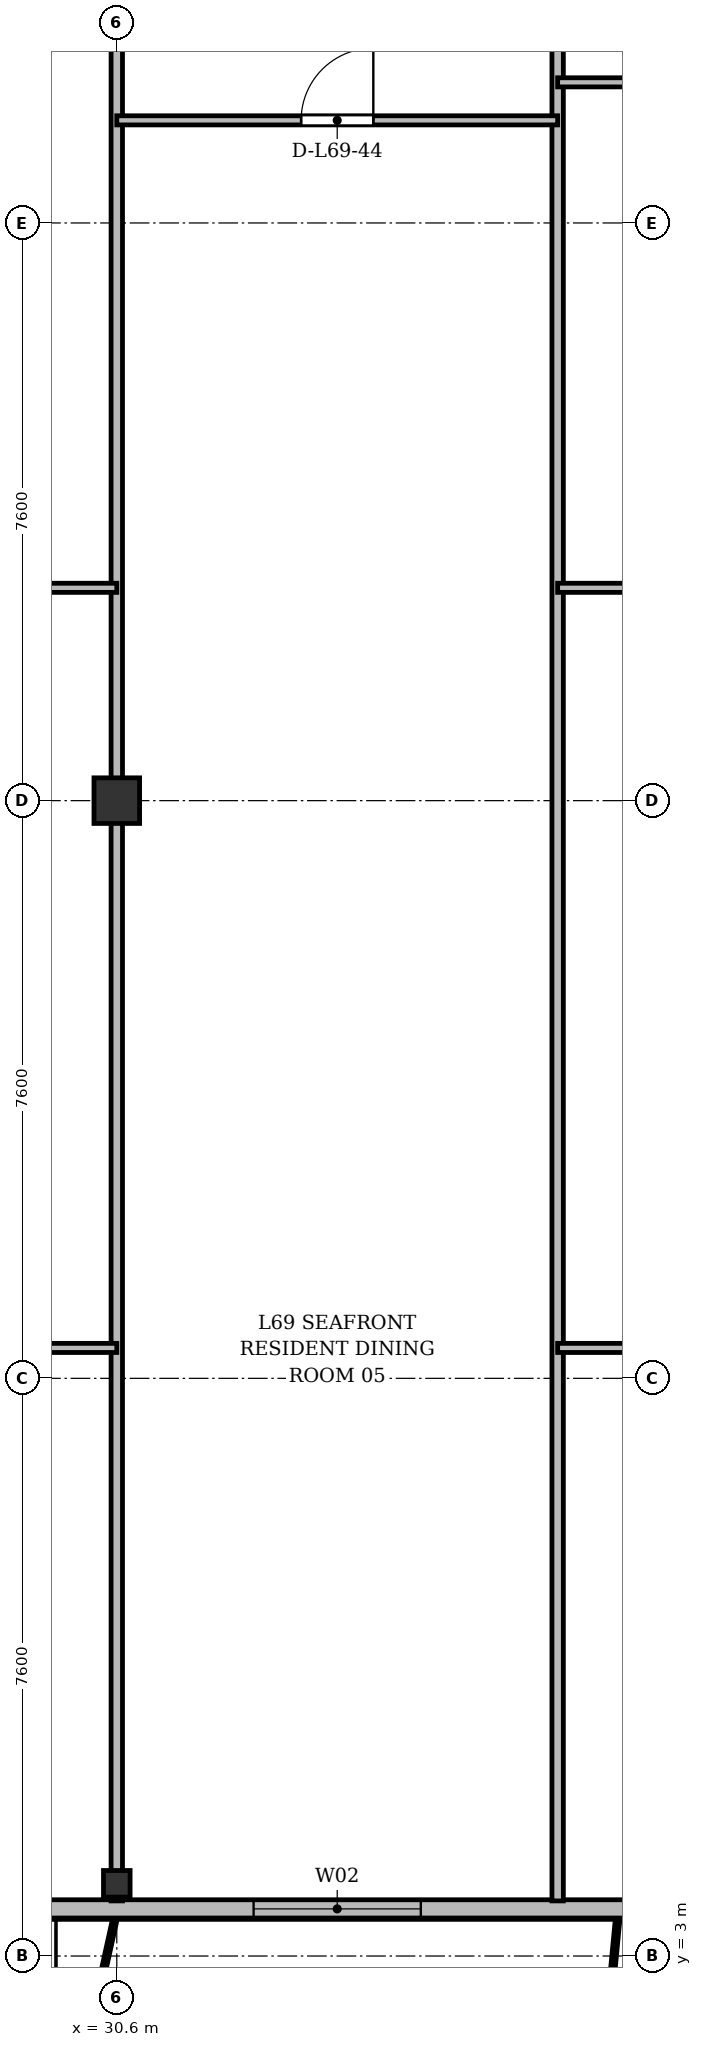
"""IFC4 building model, lengths in metres.
Left out: names, types, materials, properties, quantities, classifications, styles, units other than length and angle.
Written with IfcOpenShell. Run it as: python <this file> out.ifc"""

import sys

from ifc_helpers import new_model, si_unit, direction, frame, frame_2d, origin, origin_2d, place, context, subcontext, project, spatial, rectangle, i_section, extrude, source, transform, mapped, element, fill, save


model = new_model("IFC4")
c1 = context("Model", 3, precision=1e-05, world=origin(), true_north=direction((0.0, 1.0)))
c2 = subcontext(c1, "Body", "Model", "MODEL_VIEW")
j1 = project(units=[si_unit("LENGTHUNIT", "METRE"), si_unit("PLANEANGLEUNIT", "RADIAN")], contexts=[c1])
p1 = place(None, origin())
s1 = spatial("IfcSite", under=j1, at=p1, CompositionType="ELEMENT")
p2 = place(p1, origin())
s2 = spatial("IfcBuilding", under=s1, at=p2, CompositionType="ELEMENT")
p3 = place(p2, frame((0.0, 0.0, 266.7)))
s3 = spatial("IfcBuildingStorey", under=s2, at=p3, CompositionType="ELEMENT", Elevation=266.7)
m1 = source(origin(), c2, "Body", "SweptSolid", [
    extrude(i_section(OverallWidth=0.35, OverallDepth=0.35, WebThickness=0.018, FlangeThickness=0.028, at=origin_2d()), origin(), (0.0, 0.0, 1.0), 3.6),
])
p4 = place(p3, frame((30.6, 3.95, 0.0), z_axis=(0.0, 0.0, 1.0), x_axis=(1.0, 0.0, 0.0)))
e1 = element("IfcColumn", 1, at=p4, inside=s3, PredefinedType="COLUMN", context=c2, shape_type="MappedRepresentation", body=[
    mapped(m1, transform((0.0, 0.0, 0.0), x_axis=(1.0, 0.0, 0.0), y_axis=(0.0, 1.0, 0.0), z_axis=(0.0, 0.0, 1.0), scale=1.0)),
])
m2 = source(origin(), c2, "Body", "SweptSolid", [
    extrude(rectangle(XDim=0.6, YDim=0.6, at=origin_2d()), origin(), (0.0, 0.0, 1.0), 3.6),
])
p5 = place(p3, frame((30.6, 18.2, 0.0), z_axis=(0.0, 0.0, 1.0), x_axis=(1.0, 0.0, 0.0)))
e2 = element("IfcColumn", 2, at=p5, inside=s3, PredefinedType="COLUMN", context=c2, shape_type="MappedRepresentation", body=[
    mapped(m2, transform((0.0, 0.0, 0.0), x_axis=(1.0, 0.0, 0.0), y_axis=(0.0, 1.0, 0.0), z_axis=(0.0, 0.0, 1.0), scale=1.0)),
])
p6 = place(p3, frame((63.2, 3.62, 0.0), z_axis=(0.0, 0.0, 1.0), x_axis=(-1.0, 0.0, 0.0)))
e3 = element("IfcWall", 3, at=p6, inside=s3, PredefinedType="SOLIDWALL", context=c2, shape_type="SweptSolid", body=[
    extrude(rectangle(XDim=52.0, YDim=0.24, at=frame_2d((26.0, 0.0))), origin(), (0.0, 0.0, 1.0), 3.37),
])
p7 = place(p6, frame((0.345, 0.0, 0.9)))
e4 = element("IfcOpeningElement", 4, at=p7, cuts=e3, PredefinedType="OPENING", context=c2, shape_type="SweptSolid", body=[
    extrude(rectangle(XDim=1.2, YDim=1.65, at=frame_2d((0.6, 0.825))), frame((0.0, 0.13, 0.0), z_axis=(0.0, -1.0, 0.0), x_axis=(1.0, 0.0, 0.0)), (0.0, 0.0, 1.0), 0.26),
])
p8 = place(p6, frame((2.15, 0.0, 0.9)))
e5 = element("IfcOpeningElement", 5, at=p8, cuts=e3, PredefinedType="OPENING", context=c2, shape_type="SweptSolid", body=[
    extrude(rectangle(XDim=1.8, YDim=1.8, at=frame_2d((0.9, 0.9))), frame((0.0, 0.13, 0.0), z_axis=(0.0, -1.0, 0.0), x_axis=(1.0, 0.0, 0.0)), (0.0, 0.0, 1.0), 0.26),
])
p9 = place(p6, frame((5.42, 0.0, 0.0)))
e6 = element("IfcOpeningElement", 6, at=p9, cuts=e3, PredefinedType="OPENING", context=c2, shape_type="SweptSolid", body=[
    extrude(rectangle(XDim=1.2, YDim=2.2, at=frame_2d((0.6, 1.1))), frame((0.0, 0.13, 0.0), z_axis=(0.0, -1.0, 0.0), x_axis=(1.0, 0.0, 0.0)), (0.0, 0.0, 1.0), 0.26),
])
p10 = place(p6, frame((8.75, 0.0, 0.9)))
e7 = element("IfcOpeningElement", 7, at=p10, cuts=e3, PredefinedType="OPENING", context=c2, shape_type="SweptSolid", body=[
    extrude(rectangle(XDim=1.5, YDim=1.75, at=frame_2d((0.75, 0.875))), frame((0.0, 0.13, 0.0), z_axis=(0.0, -1.0, 0.0), x_axis=(1.0, 0.0, 0.0)), (0.0, 0.0, 1.0), 0.26),
])
p11 = place(p6, frame((14.8, 0.0, 0.9)))
e8 = element("IfcOpeningElement", 8, at=p11, cuts=e3, PredefinedType="OPENING", context=c2, shape_type="SweptSolid", body=[
    extrude(rectangle(XDim=2.0, YDim=1.95, at=frame_2d((1.0, 0.975))), frame((0.0, 0.13, 0.0), z_axis=(0.0, -1.0, 0.0), x_axis=(1.0, 0.0, 0.0)), (0.0, 0.0, 1.0), 0.26),
])
p12 = place(p6, frame((20.425, 0.0, 0.9)))
e9 = element("IfcOpeningElement", 9, at=p12, cuts=e3, PredefinedType="OPENING", context=c2, shape_type="SweptSolid", body=[
    extrude(rectangle(XDim=1.65, YDim=1.85, at=frame_2d((0.825, 0.925))), frame((0.0, 0.13, 0.0), z_axis=(0.0, -1.0, 0.0), x_axis=(1.0, 0.0, 0.0)), (0.0, 0.0, 1.0), 0.26),
])
p13 = place(p6, frame((24.05, 0.0, 0.9)))
e10 = element("IfcOpeningElement", 10, at=p13, cuts=e3, PredefinedType="OPENING", context=c2, shape_type="SweptSolid", body=[
    extrude(rectangle(XDim=1.8, YDim=1.8, at=frame_2d((0.9, 0.9))), frame((0.0, 0.13, 0.0), z_axis=(0.0, -1.0, 0.0), x_axis=(1.0, 0.0, 0.0)), (0.0, 0.0, 1.0), 0.26),
])
p14 = place(p6, frame((28.6, 0.0, 0.9)))
e11 = element("IfcOpeningElement", 11, at=p14, cuts=e3, PredefinedType="OPENING", context=c2, shape_type="SweptSolid", body=[
    extrude(rectangle(XDim=2.2, YDim=1.8, at=frame_2d((1.1, 0.9))), frame((0.0, 0.13, 0.0), z_axis=(0.0, -1.0, 0.0), x_axis=(1.0, 0.0, 0.0)), (0.0, 0.0, 1.0), 0.26),
])
p15 = place(p6, frame((34.078, 0.0, 0.0)))
e12 = element("IfcOpeningElement", 12, at=p15, cuts=e3, PredefinedType="OPENING", context=c2, shape_type="SweptSolid", body=[
    extrude(rectangle(XDim=1.2, YDim=2.2, at=frame_2d((0.6, 1.1))), frame((0.0, 0.13, 0.0), z_axis=(0.0, -1.0, 0.0), x_axis=(1.0, 0.0, 0.0)), (0.0, 0.0, 1.0), 0.26),
])
p16 = place(p6, frame((37.0, 0.0, 0.9)))
e13 = element("IfcOpeningElement", 13, at=p16, cuts=e3, PredefinedType="OPENING", context=c2, shape_type="SweptSolid", body=[
    extrude(rectangle(XDim=2.0, YDim=1.95, at=frame_2d((1.0, 0.975))), frame((0.0, 0.13, 0.0), z_axis=(0.0, -1.0, 0.0), x_axis=(1.0, 0.0, 0.0)), (0.0, 0.0, 1.0), 0.26),
])
p17 = place(p6, frame((41.075, 0.0, 0.9)))
e14 = element("IfcOpeningElement", 14, at=p17, cuts=e3, PredefinedType="OPENING", context=c2, shape_type="SweptSolid", body=[
    extrude(rectangle(XDim=1.65, YDim=1.85, at=frame_2d((0.825, 0.925))), frame((0.0, 0.13, 0.0), z_axis=(0.0, -1.0, 0.0), x_axis=(1.0, 0.0, 0.0)), (0.0, 0.0, 1.0), 0.26),
])
p18 = place(p6, frame((44.19, 0.0, 0.9)))
e15 = element("IfcOpeningElement", 15, at=p18, cuts=e3, PredefinedType="OPENING", context=c2, shape_type="SweptSolid", body=[
    extrude(rectangle(XDim=1.8, YDim=1.8, at=frame_2d((0.9, 0.9))), frame((0.0, 0.13, 0.0), z_axis=(0.0, -1.0, 0.0), x_axis=(1.0, 0.0, 0.0)), (0.0, 0.0, 1.0), 0.26),
])
p19 = place(p6, frame((50.005, 0.0, 0.9)))
e16 = element("IfcOpeningElement", 16, at=p19, cuts=e3, PredefinedType="OPENING", context=c2, shape_type="SweptSolid", body=[
    extrude(rectangle(XDim=1.5, YDim=1.75, at=frame_2d((0.75, 0.875))), frame((0.0, 0.13, 0.0), z_axis=(0.0, -1.0, 0.0), x_axis=(1.0, 0.0, 0.0)), (0.0, 0.0, 1.0), 0.26),
])
p20 = place(p3, frame((30.6, 3.725, 0.0), z_axis=(0.0, 0.0, 1.0), x_axis=(0.0, 1.0, 0.0)))
e17 = element("IfcWall", 17, at=p20, inside=s3, PredefinedType="PARTITIONING", context=c2, shape_type="SweptSolid", body=[
    extrude(rectangle(XDim=27.275, YDim=0.15, at=frame_2d((13.637, 0.0))), origin(), (0.0, 0.0, 1.0), 2.87),
])
p21 = place(p3, frame((36.4, 3.725, 0.0), z_axis=(0.0, 0.0, 1.0), x_axis=(0.0, 1.0, 0.0)))
e18 = element("IfcWall", 18, at=p21, inside=s3, PredefinedType="PARTITIONING", context=c2, shape_type="SweptSolid", body=[
    extrude(rectangle(XDim=27.275, YDim=0.15, at=frame_2d((13.637, 0.0))), origin(), (0.0, 0.0, 1.0), 2.92),
])
p22 = place(p3, frame((23.4, 21.0, 0.0), z_axis=(0.0, 0.0, 1.0), x_axis=(1.0, 0.0, 0.0)))
e19 = element("IfcWall", 19, at=p22, inside=s3, PredefinedType="PARTITIONING", context=c2, shape_type="SweptSolid", body=[
    extrude(rectangle(XDim=7.2, YDim=0.12, at=frame_2d((3.6, 0.0))), origin(), (0.0, 0.0, 1.0), 2.87),
])
p23 = place(p22, frame((3.125, 0.0, 0.0)))
e20 = element("IfcOpeningElement", 20, at=p23, cuts=e19, PredefinedType="OPENING", context=c2, shape_type="SweptSolid", body=[
    extrude(rectangle(XDim=0.95, YDim=2.15, at=frame_2d((0.475, 1.075))), frame((0.0, 0.07, 0.0), z_axis=(0.0, -1.0, 0.0), x_axis=(1.0, 0.0, 0.0)), (0.0, 0.0, 1.0), 0.14),
])
p24 = place(p3, frame((27.0, 11.0, 0.0), z_axis=(0.0, 0.0, 1.0), x_axis=(1.0, 0.0, 0.0)))
e21 = element("IfcWall", 21, at=p24, inside=s3, PredefinedType="PARTITIONING", context=c2, shape_type="SweptSolid", body=[
    extrude(rectangle(XDim=3.6, YDim=0.12, at=frame_2d((1.8, 0.0))), origin(), (0.0, 0.0, 1.0), 2.87),
])
p25 = place(p24, frame((1.325, 0.0, 0.0)))
e22 = element("IfcOpeningElement", 22, at=p25, cuts=e21, PredefinedType="OPENING", context=c2, shape_type="SweptSolid", body=[
    extrude(rectangle(XDim=0.95, YDim=2.15, at=frame_2d((0.475, 1.075))), frame((0.0, 0.07, 0.0), z_axis=(0.0, -1.0, 0.0), x_axis=(1.0, 0.0, 0.0)), (0.0, 0.0, 1.0), 0.14),
])
p26 = place(p3, frame((30.6, 27.15, 0.0), z_axis=(0.0, 0.0, 1.0), x_axis=(1.0, 0.0, 0.0)))
e23 = element("IfcWall", 23, at=p26, inside=s3, PredefinedType="PARTITIONING", context=c2, shape_type="SweptSolid", body=[
    extrude(rectangle(XDim=5.8, YDim=0.12, at=frame_2d((2.9, 0.0))), origin(), (0.0, 0.0, 1.0), 2.87),
])
p27 = place(p26, frame((2.425, 0.0, 0.0)))
e24 = element("IfcOpeningElement", 24, at=p27, cuts=e23, PredefinedType="OPENING", context=c2, shape_type="SweptSolid", body=[
    extrude(rectangle(XDim=0.95, YDim=2.15, at=frame_2d((0.475, 1.075))), frame((0.0, 0.07, 0.0), z_axis=(0.0, -1.0, 0.0), x_axis=(1.0, 0.0, 0.0)), (0.0, 0.0, 1.0), 0.14),
])
p28 = place(p3, frame((36.4, 21.0, 0.0), z_axis=(0.0, 0.0, 1.0), x_axis=(1.0, 0.0, 0.0)))
e25 = element("IfcWall", 25, at=p28, inside=s3, PredefinedType="PARTITIONING", context=c2, shape_type="SweptSolid", body=[
    extrude(rectangle(XDim=7.4, YDim=0.12, at=frame_2d((3.7, 0.0))), origin(), (0.0, 0.0, 1.0), 2.87),
])
p29 = place(p28, frame((3.133, 0.0, 0.0)))
e26 = element("IfcOpeningElement", 26, at=p29, cuts=e25, PredefinedType="OPENING", context=c2, shape_type="SweptSolid", body=[
    extrude(rectangle(XDim=0.95, YDim=2.15, at=frame_2d((0.475, 1.075))), frame((0.0, 0.07, 0.0), z_axis=(0.0, -1.0, 0.0), x_axis=(1.0, 0.0, 0.0)), (0.0, 0.0, 1.0), 0.14),
])
p30 = place(p3, frame((36.4, 27.65, 0.0), z_axis=(0.0, 0.0, 1.0), x_axis=(1.0, 0.0, 0.0)))
e27 = element("IfcWall", 27, at=p30, inside=s3, PredefinedType="PARTITIONING", context=c2, shape_type="SweptSolid", body=[
    extrude(rectangle(XDim=2.4, YDim=0.12, at=frame_2d((1.2, 0.0))), origin(), (0.0, 0.0, 1.0), 3.37),
])
p31 = place(p3, frame((36.4, 11.0, 0.0), z_axis=(0.0, 0.0, 1.0), x_axis=(1.0, 0.0, 0.0)))
e28 = element("IfcWall", 28, at=p31, inside=s3, PredefinedType="PARTITIONING", context=c2, shape_type="SweptSolid", body=[
    extrude(rectangle(XDim=3.7, YDim=0.12, at=frame_2d((1.85, 0.0))), origin(), (0.0, 0.0, 1.0), 3.37),
])
p32 = place(p31, frame((1.285, 0.0, 0.0)))
e29 = element("IfcOpeningElement", 29, at=p32, cuts=e28, PredefinedType="OPENING", context=c2, shape_type="SweptSolid", body=[
    extrude(rectangle(XDim=0.95, YDim=2.15, at=frame_2d((0.475, 1.075))), frame((0.0, 0.07, 0.0), z_axis=(0.0, -1.0, 0.0), x_axis=(1.0, 0.0, 0.0)), (0.0, 0.0, 1.0), 0.14),
])
m3 = source(origin(), c2, "Body", "SweptSolid", [
    extrude(rectangle(XDim=2.2, YDim=1.8, at=frame_2d((1.1, 0.9))), frame((0.0, 0.03, 0.0), z_axis=(0.0, -1.0, 0.0), x_axis=(1.0, 0.0, 0.0)), (0.0, 0.0, 1.0), 0.06),
])
p33 = place(p14, origin())
e30 = element("IfcWindow", 30, at=p33, inside=s3, PartitioningType="SINGLE_PANEL", PredefinedType="WINDOW", context=c2, shape_type="MappedRepresentation", body=[
    mapped(m3, transform((0.0, 0.0, 0.0), x_axis=(1.0, 0.0, 0.0), y_axis=(0.0, 1.0, 0.0), z_axis=(0.0, 0.0, 1.0), scale=1.0)),
])
fill(e11, e30)
m4 = source(origin(), c2, "Body", "SweptSolid", [
    extrude(rectangle(XDim=0.95, YDim=2.15, at=frame_2d((0.475, 1.075))), frame((0.0, 0.025, 0.0), z_axis=(0.0, -1.0, 0.0), x_axis=(1.0, 0.0, 0.0)), (0.0, 0.0, 1.0), 0.05),
])
p34 = place(p27, origin())
e31 = element("IfcDoor", 31, at=p34, inside=s3, OperationType="SINGLE_SWING_RIGHT", PredefinedType="DOOR", context=c2, shape_type="MappedRepresentation", body=[
    mapped(m4, transform((0.0, 0.0, 0.0), x_axis=(1.0, 0.0, 0.0), y_axis=(0.0, 1.0, 0.0), z_axis=(0.0, 0.0, 1.0), scale=1.0)),
])
fill(e24, e31)
save(model, sys.argv[1])
